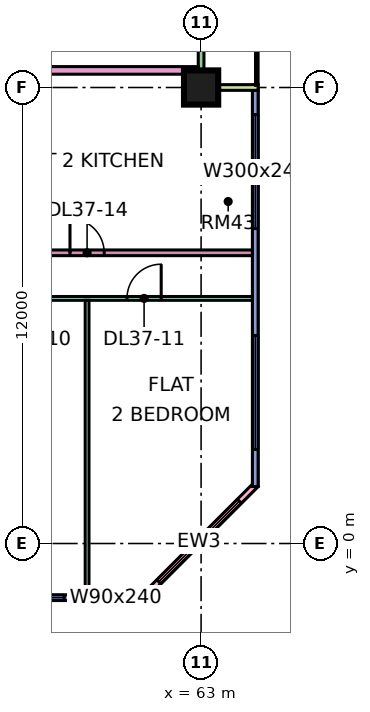
"""IFC4 building model, lengths in metres.
Left out: names, types, materials, properties, quantities, classifications, styles, units other than length and angle.
Written with IfcOpenShell. Run it as: python <this file> out.ifc"""

import sys

from ifc_helpers import new_model, si_unit, direction, frame, frame_2d, origin, origin_2d, place, context, subcontext, project, spatial, rectangle, extrude, element, fill, save


model = new_model("IFC4")
c1 = context("Model", 3, precision=1e-05, world=origin(), true_north=direction((0.0, 1.0)))
c2 = subcontext(c1, "Body", "Model", "MODEL_VIEW")
j1 = project(units=[si_unit("LENGTHUNIT", "METRE"), si_unit("PLANEANGLEUNIT", "RADIAN")], contexts=[c1])
p1 = place(None, origin())
s1 = spatial("IfcSite", under=j1, at=p1, CompositionType="ELEMENT")
p2 = place(p1, origin())
s2 = spatial("IfcBuilding", under=s1, at=p2, CompositionType="ELEMENT")
p3 = place(p2, frame((0.0, 0.0, 164.9)))
s3 = spatial("IfcBuildingStorey", under=s2, at=p3, CompositionType="ELEMENT", Elevation=164.9)
p4 = place(p3, frame((63.0, 12.0, 0.0), z_axis=(0.0, 0.0, 1.0), x_axis=(1.0, 0.0, 0.0)))
e1 = element("IfcColumn", 1, at=p4, inside=s3, PredefinedType="COLUMN", context=c2, shape_type="SweptSolid", body=[
    extrude(rectangle(XDim=0.9, YDim=0.9, at=origin_2d()), origin(), (0.0, 0.0, 1.0), 3.75),
])
p5 = place(p3, frame((48.075, -1.425, 0.0), z_axis=(0.0, 0.0, 1.0), x_axis=(1.0, 0.0, 0.0)))
e2 = element("IfcWall", 2, at=p5, inside=s3, PredefinedType="SOLIDWALL", context=c2, shape_type="SweptSolid", body=[
    extrude(rectangle(XDim=13.425, YDim=0.15, at=frame_2d((6.712, 0.0))), origin(), (0.0, 0.0, 1.0), 3.35),
])
p6 = place(p5, frame((1.462, 0.0, 0.45)))
e3 = element("IfcOpeningElement", 3, at=p6, cuts=e2, PredefinedType="OPENING", context=c2, shape_type="SweptSolid", body=[
    extrude(rectangle(XDim=3.0, YDim=2.4, at=frame_2d((1.5, 1.2))), frame((0.0, 0.085, 0.0), z_axis=(0.0, -1.0, 0.0), x_axis=(1.0, 0.0, 0.0)), (0.0, 0.0, 1.0), 0.17),
])
p7 = place(p5, frame((6.525, 0.0, 0.45)))
e4 = element("IfcOpeningElement", 4, at=p7, cuts=e2, PredefinedType="OPENING", context=c2, shape_type="SweptSolid", body=[
    extrude(rectangle(XDim=1.8, YDim=2.4, at=frame_2d((0.9, 1.2))), frame((0.0, 0.085, 0.0), z_axis=(0.0, -1.0, 0.0), x_axis=(1.0, 0.0, 0.0)), (0.0, 0.0, 1.0), 0.17),
])
p8 = place(p5, frame((9.525, 0.0, 0.45)))
e5 = element("IfcOpeningElement", 5, at=p8, cuts=e2, PredefinedType="OPENING", context=c2, shape_type="SweptSolid", body=[
    extrude(rectangle(XDim=1.8, YDim=2.4, at=frame_2d((0.9, 1.2))), frame((0.0, 0.085, 0.0), z_axis=(0.0, -1.0, 0.0), x_axis=(1.0, 0.0, 0.0)), (0.0, 0.0, 1.0), 0.17),
])
p9 = place(p5, frame((12.225, 0.0, 0.45)))
e6 = element("IfcOpeningElement", 6, at=p9, cuts=e2, PredefinedType="OPENING", context=c2, shape_type="SweptSolid", body=[
    extrude(rectangle(XDim=0.9, YDim=2.4, at=frame_2d((0.45, 1.2))), frame((0.0, 0.085, 0.0), z_axis=(0.0, -1.0, 0.0), x_axis=(1.0, 0.0, 0.0)), (0.0, 0.0, 1.0), 0.17),
])
p10 = place(p3, frame((61.447, -1.447, 0.0), z_axis=(0.0, 0.0, 1.0), x_axis=(0.707106781187, 0.707106781187, 0.0)))
e7 = element("IfcWall", 7, at=p10, inside=s3, PredefinedType="SOLIDWALL", context=c2, shape_type="SweptSolid", body=[
    extrude(rectangle(XDim=4.243, YDim=0.15, at=frame_2d((2.121, 0.0))), origin(), (0.0, 0.0, 1.0), 3.35),
])
p11 = place(p10, frame((0.621, 0.0, 0.45)))
e8 = element("IfcOpeningElement", 8, at=p11, cuts=e7, PredefinedType="OPENING", context=c2, shape_type="SweptSolid", body=[
    extrude(rectangle(XDim=3.0, YDim=2.4, at=frame_2d((1.5, 1.2))), frame((0.0, 0.085, 0.0), z_axis=(0.0, -1.0, 0.0), x_axis=(1.0, 0.0, 0.0)), (0.0, 0.0, 1.0), 0.17),
])
p12 = place(p3, frame((64.425, 1.5, 0.0), z_axis=(0.0, 0.0, 1.0), x_axis=(0.0, 1.0, 0.0)))
e9 = element("IfcWall", 9, at=p12, inside=s3, PredefinedType="SOLIDWALL", context=c2, shape_type="SweptSolid", body=[
    extrude(rectangle(XDim=10.425, YDim=0.15, at=frame_2d((5.212, 0.0))), origin(), (0.0, 0.0, 1.0), 3.35),
])
p13 = place(p12, frame((0.975, 0.0, 0.45)))
e10 = element("IfcOpeningElement", 10, at=p13, cuts=e9, PredefinedType="OPENING", context=c2, shape_type="SweptSolid", body=[
    extrude(rectangle(XDim=3.0, YDim=2.4, at=frame_2d((1.5, 1.2))), frame((0.0, 0.085, 0.0), z_axis=(0.0, -1.0, 0.0), x_axis=(1.0, 0.0, 0.0)), (0.0, 0.0, 1.0), 0.17),
])
p14 = place(p12, frame((6.788, 0.0, 0.45)))
e11 = element("IfcOpeningElement", 11, at=p14, cuts=e9, PredefinedType="OPENING", context=c2, shape_type="SweptSolid", body=[
    extrude(rectangle(XDim=3.0, YDim=2.4, at=frame_2d((1.5, 1.2))), frame((0.0, 0.085, 0.0), z_axis=(0.0, -1.0, 0.0), x_axis=(1.0, 0.0, 0.0)), (0.0, 0.0, 1.0), 0.17),
])
p15 = place(p3, frame((63.0, 12.075, 0.0), z_axis=(0.0, 0.0, 1.0), x_axis=(0.0, 1.0, 0.0)))
e12 = element("IfcWall", 12, at=p15, inside=s3, PredefinedType="SOLIDWALL", context=c2, shape_type="SweptSolid", body=[
    extrude(rectangle(XDim=10.35, YDim=0.15, at=frame_2d((5.175, 0.0))), origin(), (0.0, 0.0, 1.0), 3.35),
])
p16 = place(p15, frame((3.975, 0.0, 0.45)))
e13 = element("IfcOpeningElement", 13, at=p16, cuts=e12, PredefinedType="OPENING", context=c2, shape_type="SweptSolid", body=[
    extrude(rectangle(XDim=2.4, YDim=2.4, at=frame_2d((1.2, 1.2))), frame((0.0, 0.085, 0.0), z_axis=(0.0, -1.0, 0.0), x_axis=(1.0, 0.0, 0.0)), (0.0, 0.0, 1.0), 0.17),
])
p17 = place(p15, frame((8.587, 0.0, 0.45)))
e14 = element("IfcOpeningElement", 14, at=p17, cuts=e12, PredefinedType="OPENING", context=c2, shape_type="SweptSolid", body=[
    extrude(rectangle(XDim=1.2, YDim=2.4, at=frame_2d((0.6, 1.2))), frame((0.0, 0.085, 0.0), z_axis=(0.0, -1.0, 0.0), x_axis=(1.0, 0.0, 0.0)), (0.0, 0.0, 1.0), 0.17),
])
p18 = place(p3, frame((64.5, 12.0, 0.0), z_axis=(0.0, 0.0, 1.0), x_axis=(-1.0, 0.0, 0.0)))
e15 = element("IfcWall", 15, at=p18, inside=s3, PredefinedType="SOLIDWALL", context=c2, shape_type="SweptSolid", body=[
    extrude(rectangle(XDim=1.5, YDim=0.15, at=frame_2d((0.75, 0.0))), origin(), (0.0, 0.0, 1.0), 3.35),
])
p19 = place(p3, frame((40.65, 12.45, 0.0), z_axis=(0.0, 0.0, 1.0), x_axis=(1.0, 0.0, 0.0)))
e16 = element("IfcWall", 16, at=p19, inside=s3, PredefinedType="PARTITIONING", context=c2, shape_type="SweptSolid", body=[
    extrude(rectangle(XDim=22.276, YDim=0.2, at=frame_2d((11.138, 0.0))), origin(), (0.0, 0.0, 1.0), 3.35),
])
p20 = place(p19, frame((11.85, 0.0, 0.0)))
e17 = element("IfcOpeningElement", 17, at=p20, cuts=e16, PredefinedType="OPENING", context=c2, shape_type="SweptSolid", body=[
    extrude(rectangle(XDim=1.0, YDim=2.1, at=frame_2d((0.5, 1.05))), frame((0.0, 0.11, 0.0), z_axis=(0.0, -1.0, 0.0), x_axis=(1.0, 0.0, 0.0)), (0.0, 0.0, 1.0), 0.22),
])
p21 = place(p19, frame((1.05, 0.0, 0.0)))
e18 = element("IfcOpeningElement", 18, at=p21, cuts=e16, PredefinedType="OPENING", context=c2, shape_type="SweptSolid", body=[
    extrude(rectangle(XDim=1.0, YDim=2.1, at=frame_2d((0.5, 1.05))), frame((0.0, 0.11, 0.0), z_axis=(0.0, -1.0, 0.0), x_axis=(1.0, 0.0, 0.0)), (0.0, 0.0, 1.0), 0.22),
])
p22 = place(p3, frame((54.225, 7.65, 0.0), z_axis=(0.0, 0.0, 1.0), x_axis=(1.0, 0.0, 0.0)))
e19 = element("IfcWall", 19, at=p22, inside=s3, PredefinedType="PARTITIONING", context=c2, shape_type="SweptSolid", body=[
    extrude(rectangle(XDim=10.125, YDim=0.15, at=frame_2d((5.062, 0.0))), origin(), (0.0, 0.0, 1.0), 3.35),
])
p23 = place(p22, frame((5.325, 0.0, 0.0)))
e20 = element("IfcOpeningElement", 20, at=p23, cuts=e19, PredefinedType="OPENING", context=c2, shape_type="SweptSolid", body=[
    extrude(rectangle(XDim=0.9, YDim=2.1, at=frame_2d((0.45, 1.05))), frame((0.0, 0.085, 0.0), z_axis=(0.0, -1.0, 0.0), x_axis=(1.0, 0.0, 0.0)), (0.0, 0.0, 1.0), 0.17),
])
p24 = place(p3, frame((57.05, 6.45, 0.0), z_axis=(0.0, 0.0, 1.0), x_axis=(1.0, 0.0, 0.0)))
e21 = element("IfcWall", 21, at=p24, inside=s3, PredefinedType="PARTITIONING", context=c2, shape_type="SweptSolid", body=[
    extrude(rectangle(XDim=7.3, YDim=0.1, at=frame_2d((3.65, 0.0))), origin(), (0.0, 0.0, 1.0), 3.35),
])
p25 = place(p24, frame((1.0, 0.0, 0.0)))
e22 = element("IfcOpeningElement", 22, at=p25, cuts=e21, PredefinedType="OPENING", context=c2, shape_type="SweptSolid", body=[
    extrude(rectangle(XDim=0.9, YDim=2.1, at=frame_2d((0.45, 1.05))), frame((0.0, 0.06, 0.0), z_axis=(0.0, -1.0, 0.0), x_axis=(1.0, 0.0, 0.0)), (0.0, 0.0, 1.0), 0.12),
])
p26 = place(p24, frame((4.0, 0.0, 0.0)))
e23 = element("IfcOpeningElement", 23, at=p26, cuts=e21, PredefinedType="OPENING", context=c2, shape_type="SweptSolid", body=[
    extrude(rectangle(XDim=0.9, YDim=2.1, at=frame_2d((0.45, 1.05))), frame((0.0, 0.06, 0.0), z_axis=(0.0, -1.0, 0.0), x_axis=(1.0, 0.0, 0.0)), (0.0, 0.0, 1.0), 0.12),
])
p27 = place(p3, frame((60.0, -1.351, 0.0), z_axis=(0.0, 0.0, 1.0), x_axis=(0.0, 1.0, 0.0)))
e24 = element("IfcWall", 24, at=p27, inside=s3, PredefinedType="PARTITIONING", context=c2, shape_type="SweptSolid", body=[
    extrude(rectangle(XDim=7.751, YDim=0.1, at=frame_2d((3.875, 0.0))), origin(), (0.0, 0.0, 1.0), 3.35),
])
p28 = place(p8, origin())
e25 = element("IfcWindow", 25, at=p28, inside=s3, PartitioningType="SINGLE_PANEL", PredefinedType="WINDOW", context=c2, shape_type="SweptSolid", body=[
    extrude(rectangle(XDim=1.8, YDim=2.4, at=frame_2d((0.9, 1.2))), frame((0.0, 0.03, 0.0), z_axis=(0.0, -1.0, 0.0), x_axis=(1.0, 0.0, 0.0)), (0.0, 0.0, 1.0), 0.06),
])
fill(e5, e25)
p29 = place(p9, origin())
e26 = element("IfcWindow", 26, at=p29, inside=s3, PartitioningType="SINGLE_PANEL", PredefinedType="WINDOW", context=c2, shape_type="SweptSolid", body=[
    extrude(rectangle(XDim=0.9, YDim=2.4, at=frame_2d((0.45, 1.2))), frame((0.0, 0.03, 0.0), z_axis=(0.0, -1.0, 0.0), x_axis=(1.0, 0.0, 0.0)), (0.0, 0.0, 1.0), 0.06),
])
fill(e6, e26)
p30 = place(p11, origin())
e27 = element("IfcWindow", 27, at=p30, inside=s3, PartitioningType="SINGLE_PANEL", PredefinedType="WINDOW", context=c2, shape_type="SweptSolid", body=[
    extrude(rectangle(XDim=3.0, YDim=2.4, at=frame_2d((1.5, 1.2))), frame((0.0, 0.03, 0.0), z_axis=(0.0, -1.0, 0.0), x_axis=(1.0, 0.0, 0.0)), (0.0, 0.0, 1.0), 0.06),
])
fill(e8, e27)
p31 = place(p13, origin())
e28 = element("IfcWindow", 28, at=p31, inside=s3, PartitioningType="SINGLE_PANEL", PredefinedType="WINDOW", context=c2, shape_type="SweptSolid", body=[
    extrude(rectangle(XDim=3.0, YDim=2.4, at=frame_2d((1.5, 1.2))), frame((0.0, 0.03, 0.0), z_axis=(0.0, -1.0, 0.0), x_axis=(1.0, 0.0, 0.0)), (0.0, 0.0, 1.0), 0.06),
])
fill(e10, e28)
p32 = place(p14, origin())
e29 = element("IfcWindow", 29, at=p32, inside=s3, PartitioningType="SINGLE_PANEL", PredefinedType="WINDOW", context=c2, shape_type="SweptSolid", body=[
    extrude(rectangle(XDim=3.0, YDim=2.4, at=frame_2d((1.5, 1.2))), frame((0.0, 0.03, 0.0), z_axis=(0.0, -1.0, 0.0), x_axis=(1.0, 0.0, 0.0)), (0.0, 0.0, 1.0), 0.06),
])
fill(e11, e29)
p33 = place(p26, frame((0.9, 0.0, 0.0), z_axis=(0.0, 0.0, 1.0), x_axis=(-1.0, 0.0, 0.0)))
e30 = element("IfcDoor", 30, at=p33, inside=s3, OperationType="SINGLE_SWING_RIGHT", PredefinedType="DOOR", context=c2, shape_type="SweptSolid", body=[
    extrude(rectangle(XDim=0.9, YDim=2.1, at=frame_2d((0.45, 1.05))), frame((0.0, 0.025, 0.0), z_axis=(0.0, -1.0, 0.0), x_axis=(1.0, 0.0, 0.0)), (0.0, 0.0, 1.0), 0.05),
])
fill(e23, e30)
p34 = place(p23, origin())
e31 = element("IfcDoor", 31, at=p34, inside=s3, OperationType="SINGLE_SWING_LEFT", PredefinedType="DOOR", context=c2, shape_type="SweptSolid", body=[
    extrude(rectangle(XDim=0.9, YDim=2.1, at=frame_2d((0.45, 1.05))), frame((0.0, 0.025, 0.0), z_axis=(0.0, -1.0, 0.0), x_axis=(1.0, 0.0, 0.0)), (0.0, 0.0, 1.0), 0.05),
])
fill(e20, e31)
save(model, sys.argv[1])
